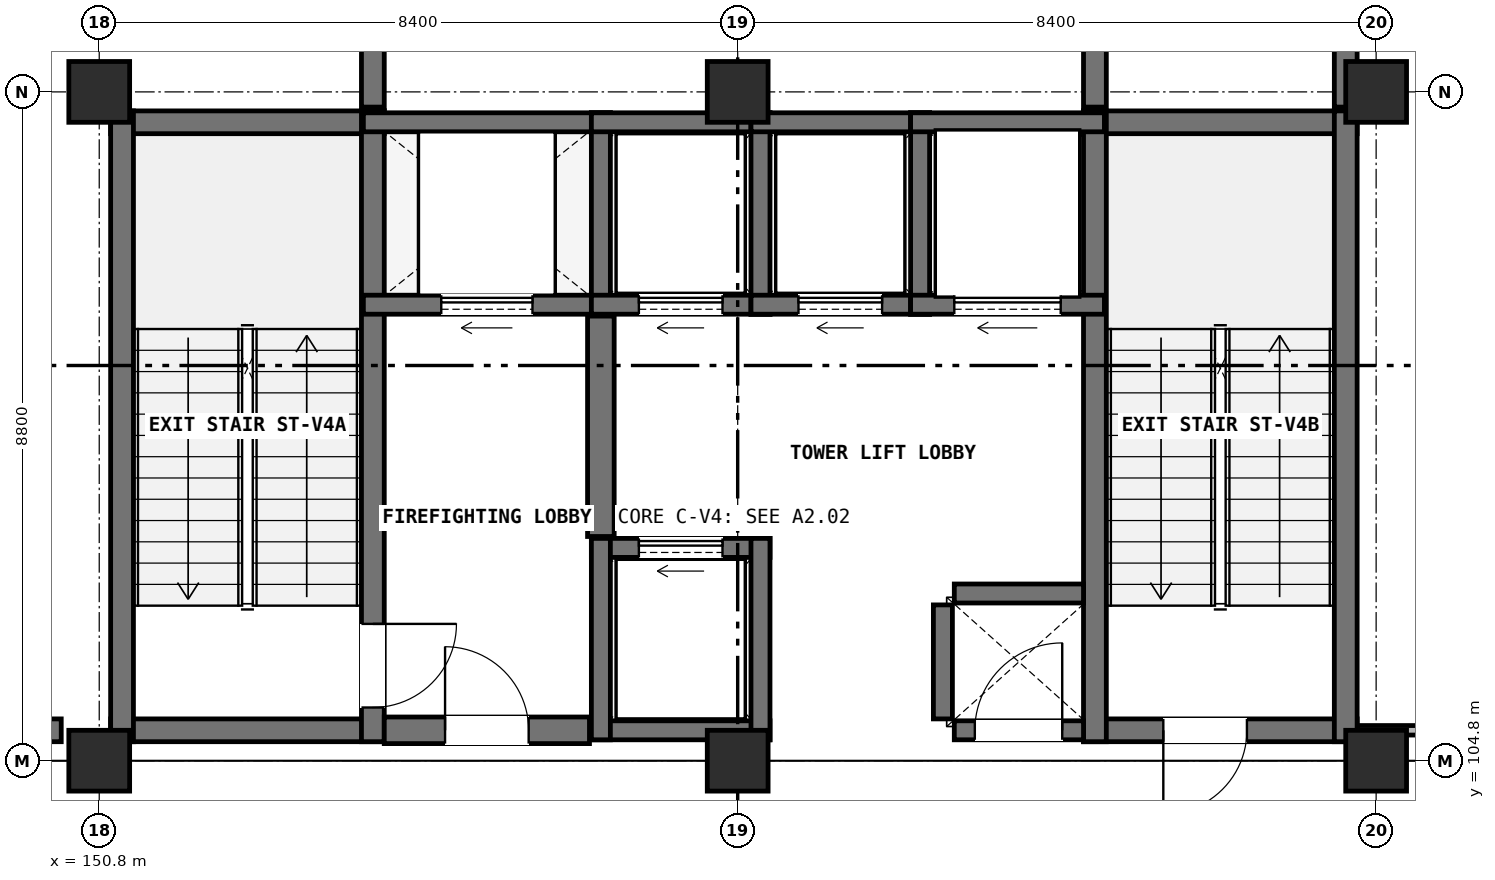
"""IFC4 building model, lengths in metres.
Left out: names, types, materials, properties, quantities, classifications, styles, units other than length and angle.
Written with IfcOpenShell. Run it as: python <this file> out.ifc"""

import sys

from ifc_helpers import new_model, si_unit, direction, frame, frame_2d, origin, origin_2d, place, context, subcontext, project, spatial, rectangle, extrude, element, fill, save


model = new_model("IFC4")
c1 = context("Model", 3, precision=1e-05, world=origin(), true_north=direction((0.0, 1.0)))
c2 = subcontext(c1, "Body", "Model", "MODEL_VIEW")
j1 = project(units=[si_unit("LENGTHUNIT", "METRE"), si_unit("PLANEANGLEUNIT", "RADIAN")], contexts=[c1])
p1 = place(None, origin())
s1 = spatial("IfcSite", under=j1, at=p1, CompositionType="ELEMENT")
p2 = place(p1, origin())
s2 = spatial("IfcBuilding", under=s1, at=p2, CompositionType="ELEMENT")
p3 = place(p2, origin())
s3 = spatial("IfcBuildingStorey", under=s2, at=p3, CompositionType="ELEMENT", Elevation=0.0)
for number, where, z_axis, x_axis in (
    (1, (150.8, 104.8, 0.0), (0.0, 0.0, 1.0), (1.0, 0.0, 0.0)),
    (2, (150.8, 113.6, 0.0), (0.0, 0.0, 1.0), (1.0, 0.0, 0.0)),
    (3, (159.2, 104.8, 0.0), (0.0, 0.0, 1.0), (1.0, 0.0, 0.0)),
    (4, (159.2, 113.6, 0.0), (0.0, 0.0, 1.0), (1.0, 0.0, 0.0)),
    (5, (167.6, 104.8, 0.0), (0.0, 0.0, 1.0), (1.0, 0.0, 0.0)),
    (6, (167.6, 113.6, 0.0), (0.0, 0.0, 1.0), (1.0, 0.0, 0.0)),
):
    element("IfcColumn", number, at=place(p3, frame(where, z_axis=z_axis, x_axis=x_axis)), inside=s3, PredefinedType="COLUMN", context=c2, shape_type="SweptSolid", body=[
        extrude(rectangle(XDim=0.8, YDim=0.8, at=origin_2d()), origin(), (0.0, 0.0, 1.0), 4.8),
    ])
for number, where, z_axis, x_axis in (
    (7, (150.95, 105.2, 0.0), (0.0, 0.0, 1.0), (1.0, 0.0, 0.0)),
    (8, (150.95, 113.2, 0.0), (0.0, 0.0, 1.0), (1.0, 0.0, 0.0)),
):
    element("IfcWall", number, at=place(p3, frame(where, z_axis=z_axis, x_axis=x_axis)), inside=s3, PredefinedType="SHEAR", context=c2, shape_type="SweptSolid", body=[
        extrude(rectangle(XDim=3.6, YDim=0.3, at=frame_2d((1.8, 0.0))), origin(), (0.0, 0.0, 1.0), 4.8),
    ])
p4 = place(p3, frame((151.1, 105.05, 0.0), z_axis=(0.0, 0.0, 1.0), x_axis=(0.0, 1.0, 0.0)))
e9 = element("IfcWall", 9, at=p4, inside=s3, PredefinedType="SHEAR", context=c2, shape_type="SweptSolid", body=[
    extrude(rectangle(XDim=8.3, YDim=0.3, at=frame_2d((4.15, 0.0))), origin(), (0.0, 0.0, 1.0), 4.8),
])
p5 = place(p3, frame((154.4, 105.05, 0.0), z_axis=(0.0, 0.0, 1.0), x_axis=(0.0, 1.0, 0.0)))
e10 = element("IfcWall", 10, at=p5, inside=s3, PredefinedType="SHEAR", context=c2, shape_type="SweptSolid", body=[
    extrude(rectangle(XDim=8.3, YDim=0.3, at=frame_2d((4.15, 0.0))), origin(), (0.0, 0.0, 1.0), 4.8),
])
p6 = place(p5, frame((0.45, 0.0, 0.0)))
e11 = element("IfcOpeningElement", 11, at=p6, cuts=e10, PredefinedType="OPENING", context=c2, shape_type="SweptSolid", body=[
    extrude(rectangle(XDim=1.1, YDim=2.2, at=frame_2d((0.55, 1.1))), frame((0.0, 0.16, 0.0), z_axis=(0.0, -1.0, 0.0), x_axis=(1.0, 0.0, 0.0)), (0.0, 0.0, 1.0), 0.32),
])
p7 = place(p3, frame((163.75, 105.2, 0.0), z_axis=(0.0, 0.0, 1.0), x_axis=(1.0, 0.0, 0.0)))
e12 = element("IfcWall", 12, at=p7, inside=s3, PredefinedType="SHEAR", context=c2, shape_type="SweptSolid", body=[
    extrude(rectangle(XDim=3.6, YDim=0.3, at=frame_2d((1.8, 0.0))), origin(), (0.0, 0.0, 1.0), 4.8),
])
p8 = place(p7, frame((1.05, 0.0, 0.0)))
e13 = element("IfcOpeningElement", 13, at=p8, cuts=e12, PredefinedType="OPENING", context=c2, shape_type="SweptSolid", body=[
    extrude(rectangle(XDim=1.1, YDim=2.2, at=frame_2d((0.55, 1.1))), frame((0.0, 0.16, 0.0), z_axis=(0.0, -1.0, 0.0), x_axis=(1.0, 0.0, 0.0)), (0.0, 0.0, 1.0), 0.32),
])
p9 = place(p3, frame((163.75, 113.2, 0.0), z_axis=(0.0, 0.0, 1.0), x_axis=(1.0, 0.0, 0.0)))
e14 = element("IfcWall", 14, at=p9, inside=s3, PredefinedType="SHEAR", context=c2, shape_type="SweptSolid", body=[
    extrude(rectangle(XDim=3.6, YDim=0.3, at=frame_2d((1.8, 0.0))), origin(), (0.0, 0.0, 1.0), 4.8),
])
for number, where, z_axis, x_axis in (
    (15, (163.9, 105.05, 0.0), (0.0, 0.0, 1.0), (0.0, 1.0, 0.0)),
    (16, (167.2, 105.05, 0.0), (0.0, 0.0, 1.0), (0.0, 1.0, 0.0)),
):
    element("IfcWall", number, at=place(p3, frame(where, z_axis=z_axis, x_axis=x_axis)), inside=s3, PredefinedType="SHEAR", context=c2, shape_type="SweptSolid", body=[
        extrude(rectangle(XDim=8.3, YDim=0.3, at=frame_2d((4.15, 0.0))), origin(), (0.0, 0.0, 1.0), 4.8),
    ])
p10 = place(p3, frame((154.275, 110.8, 0.0), z_axis=(0.0, 0.0, 1.0), x_axis=(1.0, 0.0, 0.0)))
e17 = element("IfcWall", 17, at=p10, inside=s3, PredefinedType="SOLIDWALL", context=c2, shape_type="SweptSolid", body=[
    extrude(rectangle(XDim=3.25, YDim=0.25, at=frame_2d((1.625, 0.0))), origin(), (0.0, 0.0, 1.0), 4.48),
])
p11 = place(p10, frame((1.025, 0.0, 0.0)))
e18 = element("IfcOpeningElement", 18, at=p11, cuts=e17, PredefinedType="OPENING", context=c2, shape_type="SweptSolid", body=[
    extrude(rectangle(XDim=1.2, YDim=2.2, at=frame_2d((0.6, 1.1))), frame((0.0, 0.135, 0.0), z_axis=(0.0, -1.0, 0.0), x_axis=(1.0, 0.0, 0.0)), (0.0, 0.0, 1.0), 0.27),
])
p12 = place(p3, frame((154.275, 113.2, 0.0), z_axis=(0.0, 0.0, 1.0), x_axis=(1.0, 0.0, 0.0)))
e19 = element("IfcWall", 19, at=p12, inside=s3, PredefinedType="SOLIDWALL", context=c2, shape_type="SweptSolid", body=[
    extrude(rectangle(XDim=3.25, YDim=0.25, at=frame_2d((1.625, 0.0))), origin(), (0.0, 0.0, 1.0), 4.48),
])
p13 = place(p3, frame((157.4, 110.675, 0.0), z_axis=(0.0, 0.0, 1.0), x_axis=(0.0, 1.0, 0.0)))
e20 = element("IfcWall", 20, at=p13, inside=s3, PredefinedType="SOLIDWALL", context=c2, shape_type="SweptSolid", body=[
    extrude(rectangle(XDim=2.65, YDim=0.25, at=frame_2d((1.325, 0.0))), origin(), (0.0, 0.0, 1.0), 4.48),
])
p14 = place(p3, frame((157.275, 110.8, 0.0), z_axis=(0.0, 0.0, 1.0), x_axis=(1.0, 0.0, 0.0)))
e21 = element("IfcWall", 21, at=p14, inside=s3, PredefinedType="SOLIDWALL", context=c2, shape_type="SweptSolid", body=[
    extrude(rectangle(XDim=2.35, YDim=0.25, at=frame_2d((1.175, 0.0))), origin(), (0.0, 0.0, 1.0), 4.48),
])
p15 = place(p14, frame((0.625, 0.0, 0.0)))
e22 = element("IfcOpeningElement", 22, at=p15, cuts=e21, PredefinedType="OPENING", context=c2, shape_type="SweptSolid", body=[
    extrude(rectangle(XDim=1.1, YDim=2.2, at=frame_2d((0.55, 1.1))), frame((0.0, 0.135, 0.0), z_axis=(0.0, -1.0, 0.0), x_axis=(1.0, 0.0, 0.0)), (0.0, 0.0, 1.0), 0.27),
])
p16 = place(p3, frame((157.275, 113.2, 0.0), z_axis=(0.0, 0.0, 1.0), x_axis=(1.0, 0.0, 0.0)))
e23 = element("IfcWall", 23, at=p16, inside=s3, PredefinedType="SOLIDWALL", context=c2, shape_type="SweptSolid", body=[
    extrude(rectangle(XDim=2.35, YDim=0.25, at=frame_2d((1.175, 0.0))), origin(), (0.0, 0.0, 1.0), 4.48),
])
p17 = place(p3, frame((159.5, 110.675, 0.0), z_axis=(0.0, 0.0, 1.0), x_axis=(0.0, 1.0, 0.0)))
e24 = element("IfcWall", 24, at=p17, inside=s3, PredefinedType="SOLIDWALL", context=c2, shape_type="SweptSolid", body=[
    extrude(rectangle(XDim=2.65, YDim=0.25, at=frame_2d((1.325, 0.0))), origin(), (0.0, 0.0, 1.0), 4.48),
])
p18 = place(p3, frame((159.375, 110.8, 0.0), z_axis=(0.0, 0.0, 1.0), x_axis=(1.0, 0.0, 0.0)))
e25 = element("IfcWall", 25, at=p18, inside=s3, PredefinedType="SOLIDWALL", context=c2, shape_type="SweptSolid", body=[
    extrude(rectangle(XDim=2.35, YDim=0.25, at=frame_2d((1.175, 0.0))), origin(), (0.0, 0.0, 1.0), 4.48),
])
p19 = place(p18, frame((0.625, 0.0, 0.0)))
e26 = element("IfcOpeningElement", 26, at=p19, cuts=e25, PredefinedType="OPENING", context=c2, shape_type="SweptSolid", body=[
    extrude(rectangle(XDim=1.1, YDim=2.2, at=frame_2d((0.55, 1.1))), frame((0.0, 0.135, 0.0), z_axis=(0.0, -1.0, 0.0), x_axis=(1.0, 0.0, 0.0)), (0.0, 0.0, 1.0), 0.27),
])
p20 = place(p3, frame((159.375, 113.2, 0.0), z_axis=(0.0, 0.0, 1.0), x_axis=(1.0, 0.0, 0.0)))
e27 = element("IfcWall", 27, at=p20, inside=s3, PredefinedType="SOLIDWALL", context=c2, shape_type="SweptSolid", body=[
    extrude(rectangle(XDim=2.35, YDim=0.25, at=frame_2d((1.175, 0.0))), origin(), (0.0, 0.0, 1.0), 4.48),
])
p21 = place(p3, frame((161.6, 110.675, 0.0), z_axis=(0.0, 0.0, 1.0), x_axis=(0.0, 1.0, 0.0)))
e28 = element("IfcWall", 28, at=p21, inside=s3, PredefinedType="SOLIDWALL", context=c2, shape_type="SweptSolid", body=[
    extrude(rectangle(XDim=2.65, YDim=0.25, at=frame_2d((1.325, 0.0))), origin(), (0.0, 0.0, 1.0), 4.48),
])
p22 = place(p3, frame((157.275, 105.2, 0.0), z_axis=(0.0, 0.0, 1.0), x_axis=(1.0, 0.0, 0.0)))
e29 = element("IfcWall", 29, at=p22, inside=s3, PredefinedType="SOLIDWALL", context=c2, shape_type="SweptSolid", body=[
    extrude(rectangle(XDim=2.35, YDim=0.25, at=frame_2d((1.175, 0.0))), origin(), (0.0, 0.0, 1.0), 4.48),
])
p23 = place(p3, frame((157.275, 107.6, 0.0), z_axis=(0.0, 0.0, 1.0), x_axis=(1.0, 0.0, 0.0)))
e30 = element("IfcWall", 30, at=p23, inside=s3, PredefinedType="SOLIDWALL", context=c2, shape_type="SweptSolid", body=[
    extrude(rectangle(XDim=2.35, YDim=0.25, at=frame_2d((1.175, 0.0))), origin(), (0.0, 0.0, 1.0), 4.48),
])
p24 = place(p23, frame((0.625, 0.0, 0.0)))
e31 = element("IfcOpeningElement", 31, at=p24, cuts=e30, PredefinedType="OPENING", context=c2, shape_type="SweptSolid", body=[
    extrude(rectangle(XDim=1.1, YDim=2.2, at=frame_2d((0.55, 1.1))), frame((0.0, 0.135, 0.0), z_axis=(0.0, -1.0, 0.0), x_axis=(1.0, 0.0, 0.0)), (0.0, 0.0, 1.0), 0.27),
])
for number, where, z_axis, x_axis in (
    (32, (157.4, 105.075, 0.0), (0.0, 0.0, 1.0), (0.0, 1.0, 0.0)),
    (33, (159.5, 105.075, 0.0), (0.0, 0.0, 1.0), (0.0, 1.0, 0.0)),
):
    element("IfcWall", number, at=place(p3, frame(where, z_axis=z_axis, x_axis=x_axis)), inside=s3, PredefinedType="SOLIDWALL", context=c2, shape_type="SweptSolid", body=[
        extrude(rectangle(XDim=2.65, YDim=0.25, at=frame_2d((1.325, 0.0))), origin(), (0.0, 0.0, 1.0), 4.48),
    ])
p25 = place(p3, frame((161.475, 110.8, 0.0), z_axis=(0.0, 0.0, 1.0), x_axis=(1.0, 0.0, 0.0)))
e34 = element("IfcWall", 34, at=p25, inside=s3, PredefinedType="SOLIDWALL", context=c2, shape_type="SweptSolid", body=[
    extrude(rectangle(XDim=2.55, YDim=0.25, at=frame_2d((1.275, 0.0))), origin(), (0.0, 0.0, 1.0), 4.48),
])
p26 = place(p25, frame((0.575, 0.0, 0.0)))
e35 = element("IfcOpeningElement", 35, at=p26, cuts=e34, PredefinedType="OPENING", context=c2, shape_type="SweptSolid", body=[
    extrude(rectangle(XDim=1.4, YDim=2.3, at=frame_2d((0.7, 1.15))), frame((0.0, 0.135, 0.0), z_axis=(0.0, -1.0, 0.0), x_axis=(1.0, 0.0, 0.0)), (0.0, 0.0, 1.0), 0.27),
])
p27 = place(p3, frame((161.475, 113.2, 0.0), z_axis=(0.0, 0.0, 1.0), x_axis=(1.0, 0.0, 0.0)))
e36 = element("IfcWall", 36, at=p27, inside=s3, PredefinedType="SOLIDWALL", context=c2, shape_type="SweptSolid", body=[
    extrude(rectangle(XDim=2.55, YDim=0.25, at=frame_2d((1.275, 0.0))), origin(), (0.0, 0.0, 1.0), 4.48),
])
p28 = place(p3, frame((157.4, 107.75, 0.0), z_axis=(0.0, 0.0, 1.0), x_axis=(0.0, 1.0, 0.0)))
e37 = element("IfcWall", 37, at=p28, inside=s3, PredefinedType="SHEAR", context=c2, shape_type="SweptSolid", body=[
    extrude(rectangle(XDim=2.9, YDim=0.35, at=frame_2d((1.45, 0.0))), origin(), (0.0, 0.0, 1.0), 4.48),
])
p29 = place(p3, frame((154.55, 105.2, 0.0), z_axis=(0.0, 0.0, 1.0), x_axis=(1.0, 0.0, 0.0)))
e38 = element("IfcWall", 38, at=p29, inside=s3, PredefinedType="SHEAR", context=c2, shape_type="SweptSolid", body=[
    extrude(rectangle(XDim=2.7, YDim=0.35, at=frame_2d((1.35, 0.0))), origin(), (0.0, 0.0, 1.0), 4.48),
])
p30 = place(p29, frame((0.8, 0.0, 0.0)))
e39 = element("IfcOpeningElement", 39, at=p30, cuts=e38, PredefinedType="OPENING", context=c2, shape_type="SweptSolid", body=[
    extrude(rectangle(XDim=1.1, YDim=2.2, at=frame_2d((0.55, 1.1))), frame((0.0, 0.185, 0.0), z_axis=(0.0, -1.0, 0.0), x_axis=(1.0, 0.0, 0.0)), (0.0, 0.0, 1.0), 0.37),
])
p31 = place(p3, frame((161.9, 105.35, 0.0), z_axis=(0.0, 0.0, 1.0), x_axis=(0.0, 1.0, 0.0)))
e40 = element("IfcWall", 40, at=p31, inside=s3, PredefinedType="SOLIDWALL", context=c2, shape_type="SweptSolid", body=[
    extrude(rectangle(XDim=1.5, YDim=0.25, at=frame_2d((0.75, 0.0))), origin(), (0.0, 0.0, 1.0), 4.48),
])
p32 = place(p3, frame((162.05, 107.0, 0.0), z_axis=(0.0, 0.0, 1.0), x_axis=(1.0, 0.0, 0.0)))
e41 = element("IfcWall", 41, at=p32, inside=s3, PredefinedType="SOLIDWALL", context=c2, shape_type="SweptSolid", body=[
    extrude(rectangle(XDim=1.7, YDim=0.25, at=frame_2d((0.85, 0.0))), origin(), (0.0, 0.0, 1.0), 4.48),
])
p33 = place(p3, frame((162.05, 105.2, 0.0), z_axis=(0.0, 0.0, 1.0), x_axis=(1.0, 0.0, 0.0)))
e42 = element("IfcWall", 42, at=p33, inside=s3, PredefinedType="SOLIDWALL", context=c2, shape_type="SweptSolid", body=[
    extrude(rectangle(XDim=1.7, YDim=0.25, at=frame_2d((0.85, 0.0))), origin(), (0.0, 0.0, 1.0), 4.48),
])
p34 = place(p33, frame((0.27, 0.0, 0.0)))
e43 = element("IfcOpeningElement", 43, at=p34, cuts=e42, PredefinedType="OPENING", context=c2, shape_type="SweptSolid", body=[
    extrude(rectangle(XDim=1.15, YDim=2.2, at=frame_2d((0.575, 1.1))), frame((0.0, 0.135, 0.0), z_axis=(0.0, -1.0, 0.0), x_axis=(1.0, 0.0, 0.0)), (0.0, 0.0, 1.0), 0.27),
])
p35 = place(p3, frame((147.6, 105.2, 0.0), z_axis=(0.0, 0.0, 1.0), x_axis=(1.0, 0.0, 0.0)))
e44 = element("IfcWall", 44, at=p35, inside=s3, PredefinedType="SHEAR", context=c2, shape_type="SweptSolid", body=[
    extrude(rectangle(XDim=2.7, YDim=0.3, at=frame_2d((1.35, 0.0))), origin(), (0.0, 0.0, 1.0), 4.48),
])
p36 = place(p35, frame((0.25, 0.0, 0.0)))
e45 = element("IfcOpeningElement", 45, at=p36, cuts=e44, PredefinedType="OPENING", context=c2, shape_type="SweptSolid", body=[
    extrude(rectangle(XDim=1.1, YDim=2.2, at=frame_2d((0.55, 1.1))), frame((0.0, 0.16, 0.0), z_axis=(0.0, -1.0, 0.0), x_axis=(1.0, 0.0, 0.0)), (0.0, 0.0, 1.0), 0.32),
])
p37 = place(p3, frame((154.4, 113.4, 0.0), z_axis=(0.0, 0.0, 1.0), x_axis=(0.0, 1.0, 0.0)))
e46 = element("IfcWall", 46, at=p37, inside=s3, PredefinedType="SHEAR", context=c2, shape_type="SweptSolid", body=[
    extrude(rectangle(XDim=8.7, YDim=0.3, at=frame_2d((4.35, 0.0))), origin(), (0.0, 0.0, 1.0), 4.48),
])
p38 = place(p37, frame((3.5, 0.0, 0.0)))
e47 = element("IfcOpeningElement", 47, at=p38, cuts=e46, PredefinedType="OPENING", context=c2, shape_type="SweptSolid", body=[
    extrude(rectangle(XDim=1.1, YDim=2.2, at=frame_2d((0.55, 1.1))), frame((0.0, 0.16, 0.0), z_axis=(0.0, -1.0, 0.0), x_axis=(1.0, 0.0, 0.0)), (0.0, 0.0, 1.0), 0.32),
])
for number, where, z_axis, x_axis in (
    (48, (163.9, 113.4, 0.0), (0.0, 0.0, 1.0), (0.0, 1.0, 0.0)),
    (49, (167.2, 113.4, 0.0), (0.0, 0.0, 1.0), (0.0, 1.0, 0.0)),
):
    element("IfcWall", number, at=place(p3, frame(where, z_axis=z_axis, x_axis=x_axis)), inside=s3, PredefinedType="SHEAR", context=c2, shape_type="SweptSolid", body=[
        extrude(rectangle(XDim=8.7, YDim=0.3, at=frame_2d((4.35, 0.0))), origin(), (0.0, 0.0, 1.0), 4.48),
    ])
p39 = place(p3, frame((167.355, 105.2, 0.0), z_axis=(0.0, 0.0, 1.0), x_axis=(1.0, 0.0, 0.0)))
e50 = element("IfcWall", 50, at=p39, inside=s3, PredefinedType="PARTITIONING", context=c2, shape_type="SweptSolid", body=[
    extrude(rectangle(XDim=4.245, YDim=0.125, at=frame_2d((2.123, 0.0))), origin(), (0.0, 0.0, 1.0), 4.045),
])
p40 = place(p39, frame((1.633, 0.0, 0.0)))
e51 = element("IfcOpeningElement", 51, at=p40, cuts=e50, PredefinedType="OPENING", context=c2, shape_type="SweptSolid", body=[
    extrude(rectangle(XDim=0.98, YDim=2.1, at=frame_2d((0.49, 1.05))), frame((0.0, 0.073, 0.0), z_axis=(0.0, -1.0, 0.0), x_axis=(1.0, 0.0, 0.0)), (0.0, 0.0, 1.0), 0.145),
])
p41 = place(p6, frame((1.1, 0.0, 0.0), z_axis=(0.0, 0.0, 1.0), x_axis=(-1.0, 0.0, 0.0)))
e52 = element("IfcDoor", 52, at=p41, inside=s3, OperationType="SINGLE_SWING_RIGHT", PredefinedType="DOOR", context=c2, shape_type="SweptSolid", body=[
    extrude(rectangle(XDim=1.1, YDim=2.2, at=frame_2d((0.55, 1.1))), frame((0.0, 0.025, 0.0), z_axis=(0.0, -1.0, 0.0), x_axis=(1.0, 0.0, 0.0)), (0.0, 0.0, 1.0), 0.05),
])
fill(e11, e52)
p42 = place(p8, frame((1.1, 0.0, 0.0), z_axis=(0.0, 0.0, 1.0), x_axis=(-1.0, 0.0, 0.0)))
e53 = element("IfcDoor", 53, at=p42, inside=s3, OperationType="SINGLE_SWING_LEFT", PredefinedType="DOOR", context=c2, shape_type="SweptSolid", body=[
    extrude(rectangle(XDim=1.1, YDim=2.2, at=frame_2d((0.55, 1.1))), frame((0.0, 0.025, 0.0), z_axis=(0.0, -1.0, 0.0), x_axis=(1.0, 0.0, 0.0)), (0.0, 0.0, 1.0), 0.05),
])
fill(e13, e53)
p43 = place(p11, origin())
e54 = element("IfcDoor", 54, at=p43, inside=s3, OperationType="SLIDING_TO_LEFT", PredefinedType="DOOR", context=c2, shape_type="SweptSolid", body=[
    extrude(rectangle(XDim=1.2, YDim=2.2, at=frame_2d((0.6, 1.1))), frame((0.0, 0.025, 0.0), z_axis=(0.0, -1.0, 0.0), x_axis=(1.0, 0.0, 0.0)), (0.0, 0.0, 1.0), 0.05),
])
fill(e18, e54)
p44 = place(p15, origin())
e55 = element("IfcDoor", 55, at=p44, inside=s3, OperationType="SLIDING_TO_LEFT", PredefinedType="DOOR", context=c2, shape_type="SweptSolid", body=[
    extrude(rectangle(XDim=1.1, YDim=2.2, at=frame_2d((0.55, 1.1))), frame((0.0, 0.025, 0.0), z_axis=(0.0, -1.0, 0.0), x_axis=(1.0, 0.0, 0.0)), (0.0, 0.0, 1.0), 0.05),
])
fill(e22, e55)
p45 = place(p19, origin())
e56 = element("IfcDoor", 56, at=p45, inside=s3, OperationType="SLIDING_TO_LEFT", PredefinedType="DOOR", context=c2, shape_type="SweptSolid", body=[
    extrude(rectangle(XDim=1.1, YDim=2.2, at=frame_2d((0.55, 1.1))), frame((0.0, 0.025, 0.0), z_axis=(0.0, -1.0, 0.0), x_axis=(1.0, 0.0, 0.0)), (0.0, 0.0, 1.0), 0.05),
])
fill(e26, e56)
p46 = place(p24, origin())
e57 = element("IfcDoor", 57, at=p46, inside=s3, OperationType="SLIDING_TO_LEFT", PredefinedType="DOOR", context=c2, shape_type="SweptSolid", body=[
    extrude(rectangle(XDim=1.1, YDim=2.2, at=frame_2d((0.55, 1.1))), frame((0.0, 0.025, 0.0), z_axis=(0.0, -1.0, 0.0), x_axis=(1.0, 0.0, 0.0)), (0.0, 0.0, 1.0), 0.05),
])
fill(e31, e57)
p47 = place(p26, origin())
e58 = element("IfcDoor", 58, at=p47, inside=s3, OperationType="SLIDING_TO_LEFT", PredefinedType="DOOR", context=c2, shape_type="SweptSolid", body=[
    extrude(rectangle(XDim=1.4, YDim=2.3, at=frame_2d((0.7, 1.15))), frame((0.0, 0.025, 0.0), z_axis=(0.0, -1.0, 0.0), x_axis=(1.0, 0.0, 0.0)), (0.0, 0.0, 1.0), 0.05),
])
fill(e35, e58)
p48 = place(p30, origin())
e59 = element("IfcDoor", 59, at=p48, inside=s3, OperationType="SINGLE_SWING_LEFT", PredefinedType="DOOR", context=c2, shape_type="SweptSolid", body=[
    extrude(rectangle(XDim=1.1, YDim=2.2, at=frame_2d((0.55, 1.1))), frame((0.0, 0.025, 0.0), z_axis=(0.0, -1.0, 0.0), x_axis=(1.0, 0.0, 0.0)), (0.0, 0.0, 1.0), 0.05),
])
fill(e39, e59)
p49 = place(p34, origin())
e60 = element("IfcDoor", 60, at=p49, inside=s3, OperationType="SINGLE_SWING_RIGHT", PredefinedType="DOOR", context=c2, shape_type="SweptSolid", body=[
    extrude(rectangle(XDim=1.15, YDim=2.2, at=frame_2d((0.575, 1.1))), frame((0.0, 0.025, 0.0), z_axis=(0.0, -1.0, 0.0), x_axis=(1.0, 0.0, 0.0)), (0.0, 0.0, 1.0), 0.05),
])
fill(e43, e60)
save(model, sys.argv[1])
